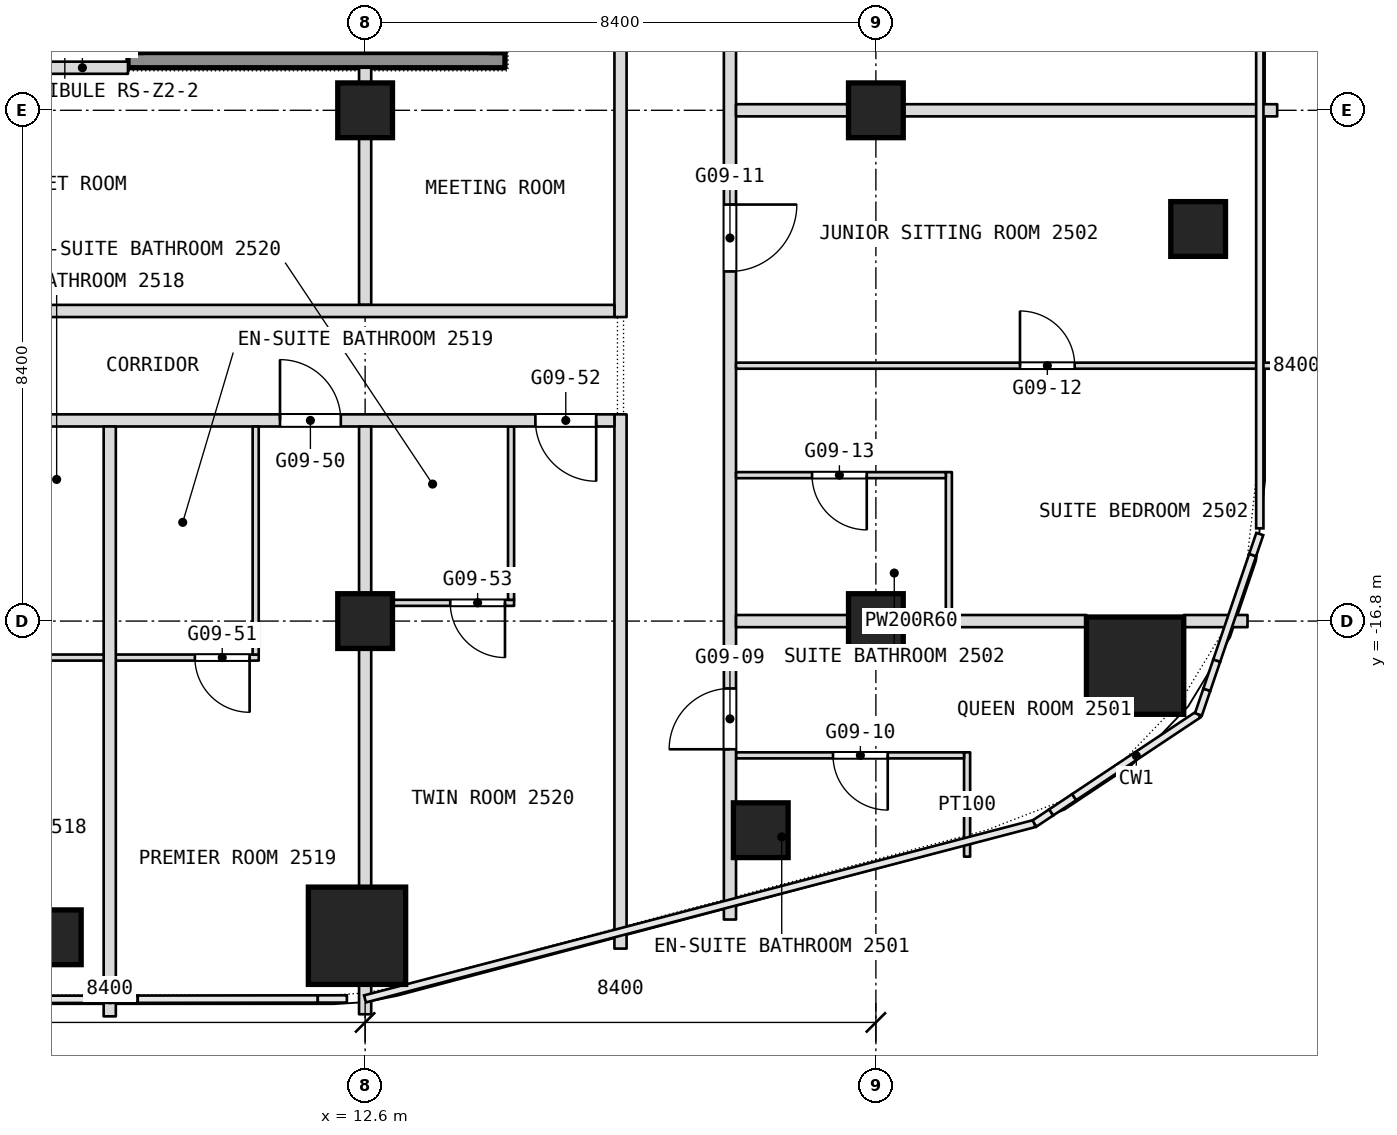
"""IFC4 building model, lengths in metres.
Left out: names, types, materials, properties, quantities, classifications, styles, units other than length and angle.
Written with IfcOpenShell. Run it as: python <this file> out.ifc"""

import sys

from ifc_helpers import new_model, si_unit, direction, frame, frame_2d, origin, origin_2d, place, context, subcontext, project, spatial, rectangle, extrude, element, fill, save


model = new_model("IFC4")
c1 = context("Model", 3, precision=1e-05, world=origin(), true_north=direction((0.0, 1.0)))
c2 = subcontext(c1, "Body", "Model", "MODEL_VIEW")
j1 = project(units=[si_unit("LENGTHUNIT", "METRE"), si_unit("PLANEANGLEUNIT", "RADIAN")], contexts=[c1])
p1 = place(None, origin())
s1 = spatial("IfcSite", under=j1, at=p1, CompositionType="ELEMENT")
p2 = place(p1, origin())
s2 = spatial("IfcBuilding", under=s1, at=p2, CompositionType="ELEMENT")
p3 = place(p2, frame((0.0, 0.0, 115.7)))
s3 = spatial("IfcBuildingStorey", under=s2, at=p3, CompositionType="ELEMENT", Elevation=115.7)
for number, where, z_axis, x_axis in (
    (1, (12.466, -21.975, 0.0), (0.0, 0.0, 1.0), (1.0, 0.0, 0.0)),
    (2, (25.263, -17.533, 0.0), (0.0, 0.0, 1.0), (1.0, 0.0, 0.0)),
):
    element("IfcColumn", number, at=place(p3, frame(where, z_axis=z_axis, x_axis=x_axis)), inside=s3, PredefinedType="COLUMN", context=c2, shape_type="SweptSolid", body=[
        extrude(rectangle(XDim=1.6, YDim=1.6, at=origin_2d()), origin(), (0.0, 0.0, 1.0), 3.6),
    ])
for number, where, z_axis, x_axis in (
    (3, (12.6, -16.8, 0.0), (0.0, 0.0, 1.0), (1.0, 0.0, 0.0)),
    (4, (12.6, -8.4, 0.0), (0.0, 0.0, 1.0), (1.0, 0.0, 0.0)),
    (5, (21.0, -16.8, 0.0), (0.0, 0.0, 1.0), (1.0, 0.0, 0.0)),
    (6, (21.0, -8.4, 0.0), (0.0, 0.0, 1.0), (1.0, 0.0, 0.0)),
    (7, (26.3, -10.352, 0.0), (0.0, 0.0, 1.0), (1.0, 0.0, 0.0)),
    (8, (19.107, -20.239, 0.0), (0.0, 0.0, 1.0), (1.0, 0.0, 0.0)),
    (9, (7.48, -22.0, 0.0), (0.0, 0.0, 1.0), (1.0, 0.0, 0.0)),
):
    element("IfcColumn", number, at=place(p3, frame(where, z_axis=z_axis, x_axis=x_axis)), inside=s3, PredefinedType="COLUMN", context=c2, shape_type="SweptSolid", body=[
        extrude(rectangle(XDim=0.9, YDim=0.9, at=origin_2d()), origin(), (0.0, 0.0, 1.0), 3.6),
    ])
p4 = place(p3, frame((22.5, -20.674, 0.0), z_axis=(0.0, 0.0, 1.0), x_axis=(0.0, 1.0, 0.0)))
e10 = element("IfcWall", 10, at=p4, inside=s3, PredefinedType="PARTITIONING", context=c2, shape_type="SweptSolid", body=[
    extrude(rectangle(XDim=1.716, YDim=0.1, at=frame_2d((0.858, 0.0))), origin(), (0.0, 0.0, 1.0), 3.34),
])
p5 = place(p3, frame((22.2, -16.7, 0.0), z_axis=(0.0, 0.0, 1.0), x_axis=(0.0, 1.0, 0.0)))
e11 = element("IfcWall", 11, at=p5, inside=s3, PredefinedType="PARTITIONING", context=c2, shape_type="SweptSolid", body=[
    extrude(rectangle(XDim=2.35, YDim=0.1, at=frame_2d((1.175, 0.0))), origin(), (0.0, 0.0, 1.0), 3.34),
])
p6 = place(p3, frame((18.7, -19.008, 0.0), z_axis=(0.0, 0.0, 1.0), x_axis=(1.0, 0.0, 0.0)))
e12 = element("IfcWall", 12, at=p6, inside=s3, PredefinedType="PARTITIONING", context=c2, shape_type="SweptSolid", body=[
    extrude(rectangle(XDim=3.75, YDim=0.1, at=frame_2d((1.875, 0.0))), origin(), (0.0, 0.0, 1.0), 3.34),
])
p7 = place(p6, frame((1.595, 0.0, 0.0)))
e13 = element("IfcOpeningElement", 13, at=p7, cuts=e12, PredefinedType="OPENING", context=c2, shape_type="SweptSolid", body=[
    extrude(rectangle(XDim=0.9, YDim=2.1, at=frame_2d((0.45, 1.05))), frame((0.0, 0.05, 0.0), z_axis=(0.0, -1.0, 0.0), x_axis=(1.0, 0.0, 0.0)), (0.0, 0.0, 1.0), 0.1),
])
p8 = place(p3, frame((18.6, -21.708, 0.0), z_axis=(0.0, 0.0, 1.0), x_axis=(0.0, 1.0, 0.0)))
e14 = element("IfcWall", 14, at=p8, inside=s3, PredefinedType="PARTITIONING", context=c2, shape_type="SweptSolid", body=[
    extrude(rectangle(XDim=49.648, YDim=0.2, at=frame_2d((24.824, 0.0))), origin(), (0.0, 0.0, 1.0), 3.34),
])
p9 = place(p8, frame((2.8, 0.0, 0.0)))
e15 = element("IfcOpeningElement", 15, at=p9, cuts=e14, PredefinedType="OPENING", context=c2, shape_type="SweptSolid", body=[
    extrude(rectangle(XDim=1.0, YDim=2.1, at=frame_2d((0.5, 1.05))), frame((0.0, 0.1, 0.0), z_axis=(0.0, -1.0, 0.0), x_axis=(1.0, 0.0, 0.0)), (0.0, 0.0, 1.0), 0.2),
])
p10 = place(p8, frame((10.658, 0.0, 0.0)))
e16 = element("IfcOpeningElement", 16, at=p10, cuts=e14, PredefinedType="OPENING", context=c2, shape_type="SweptSolid", body=[
    extrude(rectangle(XDim=1.1, YDim=2.1, at=frame_2d((0.55, 1.05))), frame((0.0, 0.1, 0.0), z_axis=(0.0, -1.0, 0.0), x_axis=(1.0, 0.0, 0.0)), (0.0, 0.0, 1.0), 0.2),
])
p11 = place(p8, frame((16.608, 0.0, 0.0)))
e17 = element("IfcOpeningElement", 17, at=p11, cuts=e14, PredefinedType="OPENING", context=c2, shape_type="SweptSolid", body=[
    extrude(rectangle(XDim=1.8, YDim=2.1, at=frame_2d((0.9, 1.05))), frame((0.0, 0.1, 0.0), z_axis=(0.0, -1.0, 0.0), x_axis=(1.0, 0.0, 0.0)), (0.0, 0.0, 1.0), 0.2),
])
p12 = place(p8, frame((24.508, 0.0, 0.0)))
e18 = element("IfcOpeningElement", 18, at=p12, cuts=e14, PredefinedType="OPENING", context=c2, shape_type="SweptSolid", body=[
    extrude(rectangle(XDim=1.0, YDim=2.1, at=frame_2d((0.5, 1.05))), frame((0.0, 0.1, 0.0), z_axis=(0.0, -1.0, 0.0), x_axis=(1.0, 0.0, 0.0)), (0.0, 0.0, 1.0), 0.2),
])
p13 = place(p8, frame((26.308, 0.0, 0.0)))
e19 = element("IfcOpeningElement", 19, at=p13, cuts=e14, PredefinedType="OPENING", context=c2, shape_type="SweptSolid", body=[
    extrude(rectangle(XDim=1.0, YDim=2.1, at=frame_2d((0.5, 1.05))), frame((0.0, 0.1, 0.0), z_axis=(0.0, -1.0, 0.0), x_axis=(1.0, 0.0, 0.0)), (0.0, 0.0, 1.0), 0.2),
])
p14 = place(p8, frame((33.708, 0.0, 0.0)))
e20 = element("IfcOpeningElement", 20, at=p14, cuts=e14, PredefinedType="OPENING", context=c2, shape_type="SweptSolid", body=[
    extrude(rectangle(XDim=1.1, YDim=2.1, at=frame_2d((0.55, 1.05))), frame((0.0, 0.1, 0.0), z_axis=(0.0, -1.0, 0.0), x_axis=(1.0, 0.0, 0.0)), (0.0, 0.0, 1.0), 0.2),
])
p15 = place(p8, frame((42.608, 0.0, 0.0)))
e21 = element("IfcOpeningElement", 21, at=p15, cuts=e14, PredefinedType="OPENING", context=c2, shape_type="SweptSolid", body=[
    extrude(rectangle(XDim=1.0, YDim=2.1, at=frame_2d((0.5, 1.05))), frame((0.0, 0.1, 0.0), z_axis=(0.0, -1.0, 0.0), x_axis=(1.0, 0.0, 0.0)), (0.0, 0.0, 1.0), 0.2),
])
p16 = place(p8, frame((44.608, 0.0, 0.0)))
e22 = element("IfcOpeningElement", 22, at=p16, cuts=e14, PredefinedType="OPENING", context=c2, shape_type="SweptSolid", body=[
    extrude(rectangle(XDim=1.0, YDim=2.1, at=frame_2d((0.5, 1.05))), frame((0.0, 0.1, 0.0), z_axis=(0.0, -1.0, 0.0), x_axis=(1.0, 0.0, 0.0)), (0.0, 0.0, 1.0), 0.2),
])
p17 = place(p3, frame((6.05, -17.4, 0.0), z_axis=(0.0, 0.0, 1.0), x_axis=(1.0, 0.0, 0.0)))
e23 = element("IfcWall", 23, at=p17, inside=s3, PredefinedType="PARTITIONING", context=c2, shape_type="SweptSolid", body=[
    extrude(rectangle(XDim=4.8, YDim=0.1, at=frame_2d((2.4, 0.0))), origin(), (0.0, 0.0, 1.0), 3.34),
])
p18 = place(p17, frame((3.75, 0.0, 0.0)))
e24 = element("IfcOpeningElement", 24, at=p18, cuts=e23, PredefinedType="OPENING", context=c2, shape_type="SweptSolid", body=[
    extrude(rectangle(XDim=0.9, YDim=2.1, at=frame_2d((0.45, 1.05))), frame((0.0, 0.05, 0.0), z_axis=(0.0, -1.0, 0.0), x_axis=(1.0, 0.0, 0.0)), (0.0, 0.0, 1.0), 0.1),
])
p19 = place(p3, frame((16.8, -22.186, 0.0), z_axis=(0.0, 0.0, 1.0), x_axis=(0.0, 1.0, 0.0)))
e25 = element("IfcWall", 25, at=p19, inside=s3, PredefinedType="PARTITIONING", context=c2, shape_type="SweptSolid", body=[
    extrude(rectangle(XDim=8.786, YDim=0.2, at=frame_2d((4.393, 0.0))), origin(), (0.0, 0.0, 1.0), 3.34),
])
p20 = place(p3, frame((16.8, -11.8, 0.0), z_axis=(0.0, 0.0, 1.0), x_axis=(0.0, 1.0, 0.0)))
e26 = element("IfcWall", 26, at=p20, inside=s3, PredefinedType="PARTITIONING", context=c2, shape_type="SweptSolid", body=[
    extrude(rectangle(XDim=9.9, YDim=0.2, at=frame_2d((4.95, 0.0))), origin(), (0.0, 0.0, 1.0), 3.34),
])
p21 = place(p3, frame((18.7, -16.8, 0.0), z_axis=(0.0, 0.0, 1.0), x_axis=(1.0, 0.0, 0.0)))
e27 = element("IfcWall", 27, at=p21, inside=s3, PredefinedType="PARTITIONING", context=c2, shape_type="SweptSolid", body=[
    extrude(rectangle(XDim=5.763, YDim=0.2, at=frame_2d((2.881, 0.0))), origin(), (0.0, 0.0, 1.0), 2.89),
])
p22 = place(p3, frame((26.063, -16.8, 0.0), z_axis=(0.0, 0.0, 1.0), x_axis=(1.0, 0.0, 0.0)))
e28 = element("IfcWall", 28, at=p22, inside=s3, PredefinedType="PARTITIONING", context=c2, shape_type="SweptSolid", body=[
    extrude(rectangle(XDim=1.049, YDim=0.2, at=frame_2d((0.524, 0.0))), origin(), (0.0, 0.0, 1.0), 3.34),
])
p23 = place(p3, frame((12.7, -16.5, 0.0), z_axis=(0.0, 0.0, 1.0), x_axis=(1.0, 0.0, 0.0)))
e29 = element("IfcWall", 29, at=p23, inside=s3, PredefinedType="PARTITIONING", context=c2, shape_type="SweptSolid", body=[
    extrude(rectangle(XDim=2.35, YDim=0.1, at=frame_2d((1.175, 0.0))), origin(), (0.0, 0.0, 1.0), 3.34),
])
p24 = place(p23, frame((1.3, 0.0, 0.0)))
e30 = element("IfcOpeningElement", 30, at=p24, cuts=e29, PredefinedType="OPENING", context=c2, shape_type="SweptSolid", body=[
    extrude(rectangle(XDim=0.9, YDim=2.1, at=frame_2d((0.45, 1.05))), frame((0.0, 0.05, 0.0), z_axis=(0.0, -1.0, 0.0), x_axis=(1.0, 0.0, 0.0)), (0.0, 0.0, 1.0), 0.1),
])
p25 = place(p3, frame((15.0, -16.45, 0.0), z_axis=(0.0, 0.0, 1.0), x_axis=(0.0, 1.0, 0.0)))
e31 = element("IfcWall", 31, at=p25, inside=s3, PredefinedType="PARTITIONING", context=c2, shape_type="SweptSolid", body=[
    extrude(rectangle(XDim=2.85, YDim=0.1, at=frame_2d((1.425, 0.0))), origin(), (0.0, 0.0, 1.0), 3.34),
])
p26 = place(p3, frame((18.7, -14.4, 0.0), z_axis=(0.0, 0.0, 1.0), x_axis=(1.0, 0.0, 0.0)))
e32 = element("IfcWall", 32, at=p26, inside=s3, PredefinedType="PARTITIONING", context=c2, shape_type="SweptSolid", body=[
    extrude(rectangle(XDim=3.45, YDim=0.1, at=frame_2d((1.725, 0.0))), origin(), (0.0, 0.0, 1.0), 3.34),
])
p27 = place(p26, frame((1.25, 0.0, 0.0)))
e33 = element("IfcOpeningElement", 33, at=p27, cuts=e32, PredefinedType="OPENING", context=c2, shape_type="SweptSolid", body=[
    extrude(rectangle(XDim=0.9, YDim=2.1, at=frame_2d((0.45, 1.05))), frame((0.0, 0.05, 0.0), z_axis=(0.0, -1.0, 0.0), x_axis=(1.0, 0.0, 0.0)), (0.0, 0.0, 1.0), 0.1),
])
p28 = place(p3, frame((-3.2, -13.5, 0.0), z_axis=(0.0, 0.0, 1.0), x_axis=(1.0, 0.0, 0.0)))
e34 = element("IfcWall", 34, at=p28, inside=s3, PredefinedType="PARTITIONING", context=c2, shape_type="SweptSolid", body=[
    extrude(rectangle(XDim=19.9, YDim=0.2, at=frame_2d((9.95, 0.0))), origin(), (0.0, 0.0, 1.0), 3.34),
])
p29 = place(p28, frame((2.3, 0.0, 0.0)))
e35 = element("IfcOpeningElement", 35, at=p29, cuts=e34, PredefinedType="OPENING", context=c2, shape_type="SweptSolid", body=[
    extrude(rectangle(XDim=1.8, YDim=2.1, at=frame_2d((0.9, 1.05))), frame((0.0, 0.1, 0.0), z_axis=(0.0, -1.0, 0.0), x_axis=(1.0, 0.0, 0.0)), (0.0, 0.0, 1.0), 0.2),
])
p30 = place(p28, frame((7.8, 0.0, 0.0)))
e36 = element("IfcOpeningElement", 36, at=p30, cuts=e34, PredefinedType="OPENING", context=c2, shape_type="SweptSolid", body=[
    extrude(rectangle(XDim=1.0, YDim=2.1, at=frame_2d((0.5, 1.05))), frame((0.0, 0.1, 0.0), z_axis=(0.0, -1.0, 0.0), x_axis=(1.0, 0.0, 0.0)), (0.0, 0.0, 1.0), 0.2),
])
p31 = place(p28, frame((14.4, 0.0, 0.0)))
e37 = element("IfcOpeningElement", 37, at=p31, cuts=e34, PredefinedType="OPENING", context=c2, shape_type="SweptSolid", body=[
    extrude(rectangle(XDim=1.0, YDim=2.1, at=frame_2d((0.5, 1.05))), frame((0.0, 0.1, 0.0), z_axis=(0.0, -1.0, 0.0), x_axis=(1.0, 0.0, 0.0)), (0.0, 0.0, 1.0), 0.2),
])
p32 = place(p28, frame((18.6, 0.0, 0.0)))
e38 = element("IfcOpeningElement", 38, at=p32, cuts=e34, PredefinedType="OPENING", context=c2, shape_type="SweptSolid", body=[
    extrude(rectangle(XDim=1.0, YDim=2.1, at=frame_2d((0.5, 1.05))), frame((0.0, 0.1, 0.0), z_axis=(0.0, -1.0, 0.0), x_axis=(1.0, 0.0, 0.0)), (0.0, 0.0, 1.0), 0.2),
])
p33 = place(p3, frame((12.6, -23.266, 0.0), z_axis=(0.0, 0.0, 1.0), x_axis=(0.0, 1.0, 0.0)))
e39 = element("IfcWall", 39, at=p33, inside=s3, PredefinedType="PARTITIONING", context=c2, shape_type="SweptSolid", body=[
    extrude(rectangle(XDim=0.491, YDim=0.2, at=frame_2d((0.246, 0.0))), origin(), (0.0, 0.0, 1.0), 3.34),
])
p34 = place(p3, frame((12.6, -21.175, 0.0), z_axis=(0.0, 0.0, 1.0), x_axis=(0.0, 1.0, 0.0)))
e40 = element("IfcWall", 40, at=p34, inside=s3, PredefinedType="PARTITIONING", context=c2, shape_type="SweptSolid", body=[
    extrude(rectangle(XDim=7.575, YDim=0.2, at=frame_2d((3.788, 0.0))), origin(), (0.0, 0.0, 1.0), 3.34),
])
p35 = place(p3, frame((12.6, -11.6, 0.0), z_axis=(0.0, 0.0, 1.0), x_axis=(0.0, 1.0, 0.0)))
e41 = element("IfcWall", 41, at=p35, inside=s3, PredefinedType="PARTITIONING", context=c2, shape_type="SweptSolid", body=[
    extrude(rectangle(XDim=3.9, YDim=0.2, at=frame_2d((1.95, 0.0))), origin(), (0.0, 0.0, 1.0), 3.34),
])
p36 = place(p3, frame((18.7, -12.6, 0.0), z_axis=(0.0, 0.0, 1.0), x_axis=(1.0, 0.0, 0.0)))
e42 = element("IfcWall", 42, at=p36, inside=s3, PredefinedType="PARTITIONING", context=c2, shape_type="SweptSolid", body=[
    extrude(rectangle(XDim=8.9, YDim=0.1, at=frame_2d((4.45, 0.0))), origin(), (0.0, 0.0, 1.0), 3.34),
])
p37 = place(p36, frame((4.67, 0.0, 0.0)))
e43 = element("IfcOpeningElement", 43, at=p37, cuts=e42, PredefinedType="OPENING", context=c2, shape_type="SweptSolid", body=[
    extrude(rectangle(XDim=0.9, YDim=2.1, at=frame_2d((0.45, 1.05))), frame((0.0, 0.05, 0.0), z_axis=(0.0, -1.0, 0.0), x_axis=(1.0, 0.0, 0.0)), (0.0, 0.0, 1.0), 0.1),
])
p38 = place(p3, frame((-4.1, -11.7, 0.0), z_axis=(0.0, 0.0, 1.0), x_axis=(1.0, 0.0, 0.0)))
e44 = element("IfcWall", 44, at=p38, inside=s3, PredefinedType="PARTITIONING", context=c2, shape_type="SweptSolid", body=[
    extrude(rectangle(XDim=20.8, YDim=0.2, at=frame_2d((10.4, 0.0))), origin(), (0.0, 0.0, 1.0), 3.34),
])
p39 = place(p3, frame((10.8, -17.35, 0.0), z_axis=(0.0, 0.0, 1.0), x_axis=(0.0, 1.0, 0.0)))
e45 = element("IfcWall", 45, at=p39, inside=s3, PredefinedType="PARTITIONING", context=c2, shape_type="SweptSolid", body=[
    extrude(rectangle(XDim=3.75, YDim=0.1, at=frame_2d((1.875, 0.0))), origin(), (0.0, 0.0, 1.0), 3.34),
])
p40 = place(p3, frame((8.4, -23.3, 0.0), z_axis=(0.0, 0.0, 1.0), x_axis=(0.0, 1.0, 0.0)))
e46 = element("IfcWall", 46, at=p40, inside=s3, PredefinedType="PARTITIONING", context=c2, shape_type="SweptSolid", body=[
    extrude(rectangle(XDim=9.7, YDim=0.2, at=frame_2d((4.85, 0.0))), origin(), (0.0, 0.0, 1.0), 3.34),
])
p41 = place(p3, frame((18.7, -8.4, 0.0), z_axis=(0.0, 0.0, 1.0), x_axis=(1.0, 0.0, 0.0)))
e47 = element("IfcWall", 47, at=p41, inside=s3, PredefinedType="PARTITIONING", context=c2, shape_type="SweptSolid", body=[
    extrude(rectangle(XDim=8.9, YDim=0.2, at=frame_2d((4.45, 0.0))), origin(), (0.0, 0.0, 1.0), 2.89),
])
p42 = place(p3, frame((7.2, -7.7, 0.0), z_axis=(0.0, 0.0, 1.0), x_axis=(1.0, 0.0, 0.0)))
e48 = element("IfcWall", 48, at=p42, inside=s3, PredefinedType="PARTITIONING", context=c2, shape_type="SweptSolid", body=[
    extrude(rectangle(XDim=1.5, YDim=0.2, at=frame_2d((0.75, 0.0))), origin(), (0.0, 0.0, 1.0), 3.34),
])
p43 = place(p3, frame((8.7, -7.575, 0.1), z_axis=(0.0, 0.0, 1.0), x_axis=(1.0, 0.0, 0.0)))
e49 = element("IfcWall", 49, at=p43, inside=s3, PredefinedType="SHEAR", context=c2, shape_type="SweptSolid", body=[
    extrude(rectangle(XDim=6.2, YDim=0.25, at=frame_2d((3.1, 0.0))), origin(), (0.0, 0.0, 1.0), 3.6),
])
p44 = place(p7, origin())
e50 = element("IfcDoor", 50, at=p44, inside=s3, OperationType="SINGLE_SWING_RIGHT", PredefinedType="DOOR", context=c2, shape_type="SweptSolid", body=[
    extrude(rectangle(XDim=0.9, YDim=2.1, at=frame_2d((0.45, 1.05))), frame((0.0, 0.025, 0.0), z_axis=(0.0, -1.0, 0.0), x_axis=(1.0, 0.0, 0.0)), (0.0, 0.0, 1.0), 0.05),
])
fill(e13, e50)
p45 = place(p9, origin())
e51 = element("IfcDoor", 51, at=p45, inside=s3, OperationType="SINGLE_SWING_RIGHT", PredefinedType="DOOR", context=c2, shape_type="SweptSolid", body=[
    extrude(rectangle(XDim=1.0, YDim=2.1, at=frame_2d((0.5, 1.05))), frame((0.0, 0.025, 0.0), z_axis=(0.0, -1.0, 0.0), x_axis=(1.0, 0.0, 0.0)), (0.0, 0.0, 1.0), 0.05),
])
fill(e15, e51)
p46 = place(p10, origin())
e52 = element("IfcDoor", 52, at=p46, inside=s3, OperationType="SINGLE_SWING_LEFT", PredefinedType="DOOR", context=c2, shape_type="SweptSolid", body=[
    extrude(rectangle(XDim=1.1, YDim=2.1, at=frame_2d((0.55, 1.05))), frame((0.0, 0.025, 0.0), z_axis=(0.0, -1.0, 0.0), x_axis=(1.0, 0.0, 0.0)), (0.0, 0.0, 1.0), 0.05),
])
fill(e16, e52)
p47 = place(p18, origin())
e53 = element("IfcDoor", 53, at=p47, inside=s3, OperationType="SINGLE_SWING_RIGHT", PredefinedType="DOOR", context=c2, shape_type="SweptSolid", body=[
    extrude(rectangle(XDim=0.9, YDim=2.1, at=frame_2d((0.45, 1.05))), frame((0.0, 0.025, 0.0), z_axis=(0.0, -1.0, 0.0), x_axis=(1.0, 0.0, 0.0)), (0.0, 0.0, 1.0), 0.05),
])
fill(e24, e53)
p48 = place(p24, origin())
e54 = element("IfcDoor", 54, at=p48, inside=s3, OperationType="SINGLE_SWING_RIGHT", PredefinedType="DOOR", context=c2, shape_type="SweptSolid", body=[
    extrude(rectangle(XDim=0.9, YDim=2.1, at=frame_2d((0.45, 1.05))), frame((0.0, 0.025, 0.0), z_axis=(0.0, -1.0, 0.0), x_axis=(1.0, 0.0, 0.0)), (0.0, 0.0, 1.0), 0.05),
])
fill(e30, e54)
p49 = place(p27, origin())
e55 = element("IfcDoor", 55, at=p49, inside=s3, OperationType="SINGLE_SWING_RIGHT", PredefinedType="DOOR", context=c2, shape_type="SweptSolid", body=[
    extrude(rectangle(XDim=0.9, YDim=2.1, at=frame_2d((0.45, 1.05))), frame((0.0, 0.025, 0.0), z_axis=(0.0, -1.0, 0.0), x_axis=(1.0, 0.0, 0.0)), (0.0, 0.0, 1.0), 0.05),
])
fill(e33, e55)
p50 = place(p31, origin())
e56 = element("IfcDoor", 56, at=p50, inside=s3, OperationType="SINGLE_SWING_RIGHT", PredefinedType="DOOR", context=c2, shape_type="SweptSolid", body=[
    extrude(rectangle(XDim=1.0, YDim=2.1, at=frame_2d((0.5, 1.05))), frame((0.0, 0.025, 0.0), z_axis=(0.0, -1.0, 0.0), x_axis=(1.0, 0.0, 0.0)), (0.0, 0.0, 1.0), 0.05),
])
fill(e37, e56)
p51 = place(p32, origin())
e57 = element("IfcDoor", 57, at=p51, inside=s3, OperationType="SINGLE_SWING_LEFT", PredefinedType="DOOR", context=c2, shape_type="SweptSolid", body=[
    extrude(rectangle(XDim=1.0, YDim=2.1, at=frame_2d((0.5, 1.05))), frame((0.0, 0.025, 0.0), z_axis=(0.0, -1.0, 0.0), x_axis=(1.0, 0.0, 0.0)), (0.0, 0.0, 1.0), 0.05),
])
fill(e38, e57)
p52 = place(p37, origin())
e58 = element("IfcDoor", 58, at=p52, inside=s3, OperationType="SINGLE_SWING_RIGHT", PredefinedType="DOOR", context=c2, shape_type="SweptSolid", body=[
    extrude(rectangle(XDim=0.9, YDim=2.1, at=frame_2d((0.45, 1.05))), frame((0.0, 0.025, 0.0), z_axis=(0.0, -1.0, 0.0), x_axis=(1.0, 0.0, 0.0)), (0.0, 0.0, 1.0), 0.05),
])
fill(e43, e58)
save(model, sys.argv[1])
